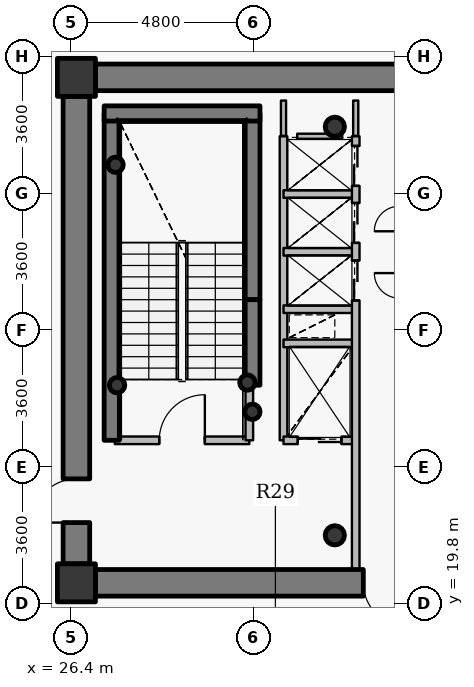
"""IFC4 building model, lengths in metres.
Left out: names, types, materials, properties, quantities, classifications, styles, units other than length and angle.
Written with IfcOpenShell. Run it as: python <this file> out.ifc"""

import sys

from ifc_helpers import new_model, si_unit, direction, frame, frame_2d, origin, origin_2d, place, context, subcontext, project, spatial, rectangle, hollow_circle, extrude, source, transform, mapped, element, fill, save


model = new_model("IFC4")
c1 = context("Model", 3, precision=1e-05, world=origin(), true_north=direction((0.0, 1.0)))
c2 = subcontext(c1, "Body", "Model", "MODEL_VIEW")
j1 = project(units=[si_unit("LENGTHUNIT", "METRE"), si_unit("PLANEANGLEUNIT", "RADIAN")], contexts=[c1])
p1 = place(None, origin())
s1 = spatial("IfcSite", under=j1, at=p1, CompositionType="ELEMENT")
p2 = place(p1, origin())
s2 = spatial("IfcBuilding", under=s1, at=p2, CompositionType="ELEMENT")
p3 = place(p2, frame((0.0, 0.0, 232.8)))
s3 = spatial("IfcBuildingStorey", under=s2, at=p3, CompositionType="ELEMENT", Elevation=232.8)
for number, where, z_axis, x_axis in (
    (1, (26.55, 20.35, 0.0), (0.0, 0.0, 1.0), (1.0, 0.0, 0.0)),
    (2, (26.55, 33.65, 0.0), (0.0, 0.0, 1.0), (1.0, 0.0, 0.0)),
):
    element("IfcColumn", number, at=place(p3, frame(where, z_axis=z_axis, x_axis=x_axis)), inside=s3, PredefinedType="COLUMN", context=c2, shape_type="SweptSolid", body=[
        extrude(rectangle(XDim=1.0, YDim=1.0, at=origin_2d()), origin(), (0.0, 0.0, 1.0), 3.75),
    ])
for number, where, z_axis, x_axis in (
    (3, (33.35, 21.6, 0.0), (0.0, 0.0, 1.0), (1.0, 0.0, 0.0)),
    (4, (33.35, 32.35, 0.0), (0.0, 0.0, 1.0), (1.0, 0.0, 0.0)),
):
    element("IfcColumn", number, at=place(p3, frame(where, z_axis=z_axis, x_axis=x_axis)), inside=s3, PredefinedType="COLUMN", context=c2, shape_type="SweptSolid", body=[
        extrude(hollow_circle(Radius=0.254, WallThickness=0.02, at=origin_2d()), origin(), (0.0, 0.0, 1.0), 3.75),
    ])
p4 = place(p3, frame((27.48, 24.1, 0.0), z_axis=(0.0, 0.0, 1.0), x_axis=(0.0, 1.0, 0.0)))
e5 = element("IfcWall", 5, at=p4, inside=s3, PredefinedType="SHEAR", context=c2, shape_type="SweptSolid", body=[
    extrude(rectangle(XDim=8.6, YDim=0.4, at=frame_2d((4.3, 0.0))), origin(), (0.0, 0.0, 1.0), 3.75),
])
p5 = place(p3, frame((31.18, 27.8, 0.0), z_axis=(0.0, 0.0, 1.0), x_axis=(0.0, 1.0, 0.0)))
e6 = element("IfcWall", 6, at=p5, inside=s3, PredefinedType="SHEAR", context=c2, shape_type="SweptSolid", body=[
    extrude(rectangle(XDim=4.9, YDim=0.4, at=frame_2d((2.45, 0.0))), origin(), (0.0, 0.0, 1.0), 3.75),
])
p6 = place(p3, frame((27.28, 32.7, 0.0), z_axis=(0.0, 0.0, 1.0), x_axis=(1.0, 0.0, 0.0)))
e7 = element("IfcWall", 7, at=p6, inside=s3, PredefinedType="SHEAR", context=c2, shape_type="SweptSolid", body=[
    extrude(rectangle(XDim=4.1, YDim=0.4, at=frame_2d((2.05, 0.0))), origin(), (0.0, 0.0, 1.0), 3.75),
])
for number, where, z_axis, x_axis in (
    (8, (27.58, 31.35, 0.0), (0.0, 0.0, 1.0), (1.0, 0.0, 0.0)),
    (9, (31.05, 25.62, 0.0), (0.0, 0.0, 1.0), (1.0, 0.0, 0.0)),
    (10, (31.18, 24.85, 0.0), (0.0, 0.0, 1.0), (1.0, 0.0, 0.0)),
    (11, (27.62, 25.55, 0.0), (0.0, 0.0, 1.0), (1.0, 0.0, 0.0)),
):
    element("IfcColumn", number, at=place(p3, frame(where, z_axis=z_axis, x_axis=x_axis)), inside=s3, PredefinedType="COLUMN", context=c2, shape_type="SweptSolid", body=[
        extrude(hollow_circle(Radius=0.203, WallThickness=0.016, at=origin_2d()), origin(), (0.0, 0.0, 1.0), 3.75),
    ])
p7 = place(p3, frame((27.05, 33.65, 0.0), z_axis=(0.0, 0.0, 1.0), x_axis=(1.0, 0.0, 0.0)))
e12 = element("IfcWall", 12, at=p7, inside=s3, PredefinedType="SHEAR", context=c2, shape_type="SweptSolid", body=[
    extrude(rectangle(XDim=17.9, YDim=0.7, at=frame_2d((8.95, 0.0))), origin(), (0.0, 0.0, 1.0), 3.05),
])
p8 = place(p7, frame((13.675, 0.0, 0.0)))
e13 = element("IfcOpeningElement", 13, at=p8, cuts=e12, PredefinedType="OPENING", context=c2, shape_type="SweptSolid", body=[
    extrude(rectangle(XDim=1.15, YDim=2.15, at=origin_2d()), frame((0.575, 0.36, 1.075), z_axis=(0.0, -1.0, 0.0), x_axis=(1.0, 0.0, 0.0)), (0.0, 0.0, 1.0), 0.72),
])
p9 = place(p3, frame((44.95, 20.35, 0.0), z_axis=(0.0, 0.0, 1.0), x_axis=(-1.0, 0.0, 0.0)))
e14 = element("IfcWall", 14, at=p9, inside=s3, PredefinedType="SHEAR", context=c2, shape_type="SweptSolid", body=[
    extrude(rectangle(XDim=17.9, YDim=0.7, at=frame_2d((8.95, 0.0))), origin(), (0.0, 0.0, 1.0), 3.05),
])
p10 = place(p9, frame((9.7, 0.0, 0.0)))
e15 = element("IfcOpeningElement", 15, at=p10, cuts=e14, PredefinedType="OPENING", context=c2, shape_type="SweptSolid", body=[
    extrude(rectangle(XDim=1.15, YDim=2.15, at=origin_2d()), frame((0.575, 0.36, 1.075), z_axis=(0.0, -1.0, 0.0), x_axis=(1.0, 0.0, 0.0)), (0.0, 0.0, 1.0), 0.72),
])
p11 = place(p3, frame((26.55, 20.85, 0.0), z_axis=(0.0, 0.0, 1.0), x_axis=(0.0, 1.0, 0.0)))
e16 = element("IfcWall", 16, at=p11, inside=s3, PredefinedType="SHEAR", context=c2, shape_type="SweptSolid", body=[
    extrude(rectangle(XDim=12.3, YDim=0.7, at=frame_2d((6.15, 0.0))), origin(), (0.0, 0.0, 1.0), 3.05),
])
p12 = place(p11, frame((1.085, 0.0, 0.0)))
e17 = element("IfcOpeningElement", 17, at=p12, cuts=e16, PredefinedType="OPENING", context=c2, shape_type="SweptSolid", body=[
    extrude(rectangle(XDim=1.15, YDim=2.15, at=origin_2d()), frame((0.575, 0.36, 1.075), z_axis=(0.0, -1.0, 0.0), x_axis=(1.0, 0.0, 0.0)), (0.0, 0.0, 1.0), 0.72),
])
p13 = place(p3, frame((31.18, 25.55, 0.0), z_axis=(0.0, 0.0, 1.0), x_axis=(0.0, 1.0, 0.0)))
e18 = element("IfcWall", 18, at=p13, inside=s3, PredefinedType="SHEAR", context=c2, shape_type="SweptSolid", body=[
    extrude(rectangle(XDim=2.25, YDim=0.4, at=frame_2d((1.125, 0.0))), origin(), (0.0, 0.0, 1.0), 3.1),
])
p14 = place(p3, frame((27.56, 24.1, 0.0), z_axis=(0.0, 0.0, 1.0), x_axis=(1.0, 0.0, 0.0)))
e19 = element("IfcWall", 19, at=p14, inside=s3, PredefinedType="PARTITIONING", context=c2, shape_type="SweptSolid", body=[
    extrude(rectangle(XDim=3.54, YDim=0.2, at=frame_2d((1.77, 0.0))), origin(), (0.0, 0.0, 1.0), 3.5),
])
p15 = place(p14, frame((1.17, 0.0, 0.0)))
e20 = element("IfcOpeningElement", 20, at=p15, cuts=e19, PredefinedType="OPENING", context=c2, shape_type="SweptSolid", body=[
    extrude(rectangle(XDim=1.2, YDim=2.15, at=origin_2d()), frame((0.6, 0.11, 1.075), z_axis=(0.0, -1.0, 0.0), x_axis=(1.0, 0.0, 0.0)), (0.0, 0.0, 1.0), 0.22),
])
p16 = place(p3, frame((31.1, 24.1, 0.0), z_axis=(0.0, 0.0, 1.0), x_axis=(0.0, 1.0, 0.0)))
e21 = element("IfcWall", 21, at=p16, inside=s3, PredefinedType="PARTITIONING", context=c2, shape_type="SweptSolid", body=[
    extrude(rectangle(XDim=1.44, YDim=0.2, at=frame_2d((0.72, 0.0))), origin(), (0.0, 0.0, 1.0), 3.5),
])
p17 = place(p3, frame((32.0, 24.1, 0.0), z_axis=(0.0, 0.0, 1.0), x_axis=(0.0, 1.0, 0.0)))
e22 = element("IfcWall", 22, at=p17, inside=s3, PredefinedType="PARTITIONING", context=c2, shape_type="SweptSolid", body=[
    extrude(rectangle(XDim=8.0, YDim=0.2, at=frame_2d((4.0, 0.0))), origin(), (0.0, 0.0, 1.0), 3.5),
])
p18 = place(p3, frame((32.0, 24.1, 0.0), z_axis=(0.0, 0.0, 1.0), x_axis=(1.0, 0.0, 0.0)))
e23 = element("IfcWall", 23, at=p18, inside=s3, PredefinedType="PARTITIONING", context=c2, shape_type="SweptSolid", body=[
    extrude(rectangle(XDim=1.9, YDim=0.2, at=frame_2d((0.95, 0.0))), origin(), (0.0, 0.0, 1.0), 3.085),
])
p19 = place(p18, frame((0.375, 0.0, 0.0)))
e24 = element("IfcOpeningElement", 24, at=p19, cuts=e23, PredefinedType="OPENING", context=c2, shape_type="SweptSolid", body=[
    extrude(rectangle(XDim=1.15, YDim=2.15, at=origin_2d()), frame((0.575, 0.11, 1.075), z_axis=(0.0, -1.0, 0.0), x_axis=(1.0, 0.0, 0.0)), (0.0, 0.0, 1.0), 0.22),
])
for number, where, z_axis, x_axis in (
    (25, (32.0, 26.65, 0.0), (0.0, 0.0, 1.0), (1.0, 0.0, 0.0)),
    (26, (32.0, 27.55, 0.0), (0.0, 0.0, 1.0), (1.0, 0.0, 0.0)),
    (27, (32.0, 29.06, 0.0), (0.0, 0.0, 1.0), (1.0, 0.0, 0.0)),
    (28, (32.0, 30.58, 0.0), (0.0, 0.0, 1.0), (1.0, 0.0, 0.0)),
):
    element("IfcWall", number, at=place(p3, frame(where, z_axis=z_axis, x_axis=x_axis)), inside=s3, PredefinedType="PARTITIONING", context=c2, shape_type="SweptSolid", body=[
        extrude(rectangle(XDim=1.9, YDim=0.2, at=frame_2d((0.95, 0.0))), origin(), (0.0, 0.0, 1.0), 3.085),
    ])
p20 = place(p3, frame((33.9, 20.7, 0.0), z_axis=(0.0, 0.0, 1.0), x_axis=(0.0, 1.0, 0.0)))
e29 = element("IfcWall", 29, at=p20, inside=s3, PredefinedType="PARTITIONING", context=c2, shape_type="SweptSolid", body=[
    extrude(rectangle(XDim=11.4, YDim=0.2, at=frame_2d((5.7, 0.0))), origin(), (0.0, 0.0, 1.0), 3.085),
])
p21 = place(p20, frame((7.08, 0.0, 0.0)))
e30 = element("IfcOpeningElement", 30, at=p21, cuts=e29, PredefinedType="OPENING", context=c2, shape_type="SweptSolid", body=[
    extrude(rectangle(XDim=1.05, YDim=2.15, at=origin_2d()), frame((0.525, 0.11, 1.075), z_axis=(0.0, -1.0, 0.0), x_axis=(1.0, 0.0, 0.0)), (0.0, 0.0, 1.0), 0.22),
])
p22 = place(p20, frame((8.595, 0.0, 0.0)))
e31 = element("IfcOpeningElement", 31, at=p22, cuts=e29, PredefinedType="OPENING", context=c2, shape_type="SweptSolid", body=[
    extrude(rectangle(XDim=1.05, YDim=2.15, at=origin_2d()), frame((0.525, 0.11, 1.075), z_axis=(0.0, -1.0, 0.0), x_axis=(1.0, 0.0, 0.0)), (0.0, 0.0, 1.0), 0.22),
])
p23 = place(p20, frame((10.095, 0.0, 0.0)))
e32 = element("IfcOpeningElement", 32, at=p23, cuts=e29, PredefinedType="OPENING", context=c2, shape_type="SweptSolid", body=[
    extrude(rectangle(XDim=1.05, YDim=2.15, at=origin_2d()), frame((0.525, 0.11, 1.075), z_axis=(0.0, -1.0, 0.0), x_axis=(1.0, 0.0, 0.0)), (0.0, 0.0, 1.0), 0.22),
])
p24 = place(p3, frame((32.36, 32.1, 0.0), z_axis=(0.0, 0.0, 1.0), x_axis=(1.0, 0.0, 0.0)))
e33 = element("IfcWall", 33, at=p24, inside=s3, PredefinedType="PARTITIONING", context=c2, shape_type="SweptSolid", body=[
    extrude(rectangle(XDim=1.18, YDim=0.135, at=frame_2d((0.59, 0.0))), origin(), (0.0, 0.0, 1.0), 3.085),
])
p25 = place(p3, frame((32.0, 33.04, 0.0), z_axis=(0.0, 0.0, 1.0), x_axis=(0.0, -1.0, 0.0)))
e34 = element("IfcWall", 34, at=p25, inside=s3, PredefinedType="PARTITIONING", context=c2, shape_type="SweptSolid", body=[
    extrude(rectangle(XDim=0.93, YDim=0.135, at=frame_2d((0.465, 0.0))), origin(), (0.0, 0.0, 1.0), 3.035),
])
p26 = place(p3, frame((33.9, 32.11, 0.0), z_axis=(0.0, 0.0, 1.0), x_axis=(0.0, 1.0, 0.0)))
e35 = element("IfcWall", 35, at=p26, inside=s3, PredefinedType="PARTITIONING", context=c2, shape_type="SweptSolid", body=[
    extrude(rectangle(XDim=0.93, YDim=0.135, at=frame_2d((0.465, 0.0))), origin(), (0.0, 0.0, 1.0), 3.085),
])
p27 = place(p3, frame((27.04, 34.0, 0.0), z_axis=(0.0, 0.0, 1.0), x_axis=(-1.0, 0.0, 0.0)))
e36 = element("IfcWall", 36, at=p27, inside=s3, PredefinedType="PARTITIONING", context=c2, shape_type="SweptSolid", body=[
    extrude(rectangle(XDim=0.84, YDim=0.135, at=frame_2d((0.42, 0.0))), origin(), (0.0, 0.0, 1.0), 2.935),
])
p28 = place(p3, frame((26.2, 33.692, 0.0), z_axis=(0.0, 0.0, 1.0), x_axis=(0.0, -1.0, 0.0)))
e37 = element("IfcWall", 37, at=p28, inside=s3, PredefinedType="PARTITIONING", context=c2, shape_type="SweptSolid", body=[
    extrude(rectangle(XDim=0.532, YDim=0.135, at=frame_2d((0.266, 0.0))), origin(), (0.0, 0.0, 1.0), 3.5),
])
p29 = place(p3, frame((26.2, 20.84, 0.0), z_axis=(0.0, 0.0, 1.0), x_axis=(0.0, -1.0, 0.0)))
e38 = element("IfcWall", 38, at=p29, inside=s3, PredefinedType="PARTITIONING", context=c2, shape_type="SweptSolid", body=[
    extrude(rectangle(XDim=0.84, YDim=0.135, at=frame_2d((0.42, 0.0))), origin(), (0.0, 0.0, 1.0), 3.5),
])
p30 = place(p3, frame((26.508, 20.0, 0.0), z_axis=(0.0, 0.0, 1.0), x_axis=(1.0, 0.0, 0.0)))
e39 = element("IfcWall", 39, at=p30, inside=s3, PredefinedType="PARTITIONING", context=c2, shape_type="SweptSolid", body=[
    extrude(rectangle(XDim=0.532, YDim=0.135, at=frame_2d((0.266, 0.0))), origin(), (0.0, 0.0, 1.0), 2.935),
])
m1 = source(origin(), c2, "Body", "SweptSolid", [
    extrude(rectangle(XDim=1.15, YDim=2.15, at=origin_2d()), frame((0.575, 0.025, 1.075), z_axis=(0.0, -1.0, 0.0), x_axis=(1.0, 0.0, 0.0)), (0.0, 0.0, 1.0), 0.05),
])
p31 = place(p12, origin())
e40 = element("IfcDoor", 40, at=p31, inside=s3, OperationType="SINGLE_SWING_LEFT", PredefinedType="DOOR", context=c2, shape_type="MappedRepresentation", body=[
    mapped(m1, transform((0.0, 0.0, 0.0), x_axis=(1.0, 0.0, 0.0), y_axis=(0.0, 1.0, 0.0), z_axis=(0.0, 0.0, 1.0), scale=1.0)),
])
fill(e17, e40)
p32 = place(p10, origin())
e41 = element("IfcDoor", 41, at=p32, inside=s3, OperationType="SINGLE_SWING_LEFT", PredefinedType="DOOR", context=c2, shape_type="MappedRepresentation", body=[
    mapped(m1, transform((0.0, 0.0, 0.0), x_axis=(1.0, 0.0, 0.0), y_axis=(0.0, 1.0, 0.0), z_axis=(0.0, 0.0, 1.0), scale=1.0)),
])
fill(e15, e41)
m2 = source(origin(), c2, "Body", "SweptSolid", [
    extrude(rectangle(XDim=1.2, YDim=2.15, at=origin_2d()), frame((0.6, 0.025, 1.075), z_axis=(0.0, -1.0, 0.0), x_axis=(1.0, 0.0, 0.0)), (0.0, 0.0, 1.0), 0.05),
])
p33 = place(p15, origin())
e42 = element("IfcDoor", 42, at=p33, inside=s3, OperationType="SINGLE_SWING_RIGHT", PredefinedType="DOOR", context=c2, shape_type="MappedRepresentation", body=[
    mapped(m2, transform((0.0, 0.0, 0.0), x_axis=(1.0, 0.0, 0.0), y_axis=(0.0, 1.0, 0.0), z_axis=(0.0, 0.0, 1.0), scale=1.0)),
])
fill(e20, e42)
m3 = source(origin(), c2, "Body", "SweptSolid", [
    extrude(rectangle(XDim=1.15, YDim=2.15, at=origin_2d()), frame((0.575, 0.025, 1.075), z_axis=(0.0, -1.0, 0.0), x_axis=(1.0, 0.0, 0.0)), (0.0, 0.0, 1.0), 0.05),
])
p34 = place(p19, origin())
e43 = element("IfcDoor", 43, at=p34, inside=s3, OperationType="DOUBLE_DOOR_SLIDING", PredefinedType="USERDEFINED", context=c2, shape_type="MappedRepresentation", body=[
    mapped(m3, transform((0.0, 0.0, 0.0), x_axis=(1.0, 0.0, 0.0), y_axis=(0.0, 1.0, 0.0), z_axis=(0.0, 0.0, 1.0), scale=1.0)),
])
fill(e24, e43)
m4 = source(origin(), c2, "Body", "SweptSolid", [
    extrude(rectangle(XDim=1.05, YDim=2.15, at=origin_2d()), frame((0.525, 0.025, 1.075), z_axis=(0.0, -1.0, 0.0), x_axis=(1.0, 0.0, 0.0)), (0.0, 0.0, 1.0), 0.05),
])
p35 = place(p21, origin())
e44 = element("IfcDoor", 44, at=p35, inside=s3, OperationType="DOUBLE_DOOR_SLIDING", PredefinedType="USERDEFINED", context=c2, shape_type="MappedRepresentation", body=[
    mapped(m4, transform((0.0, 0.0, 0.0), x_axis=(1.0, 0.0, 0.0), y_axis=(0.0, 1.0, 0.0), z_axis=(0.0, 0.0, 1.0), scale=1.0)),
])
fill(e30, e44)
p36 = place(p22, origin())
e45 = element("IfcDoor", 45, at=p36, inside=s3, OperationType="DOUBLE_DOOR_SLIDING", PredefinedType="USERDEFINED", context=c2, shape_type="MappedRepresentation", body=[
    mapped(m4, transform((0.0, 0.0, 0.0), x_axis=(1.0, 0.0, 0.0), y_axis=(0.0, 1.0, 0.0), z_axis=(0.0, 0.0, 1.0), scale=1.0)),
])
fill(e31, e45)
p37 = place(p23, origin())
e46 = element("IfcDoor", 46, at=p37, inside=s3, OperationType="DOUBLE_DOOR_SLIDING", PredefinedType="USERDEFINED", context=c2, shape_type="MappedRepresentation", body=[
    mapped(m4, transform((0.0, 0.0, 0.0), x_axis=(1.0, 0.0, 0.0), y_axis=(0.0, 1.0, 0.0), z_axis=(0.0, 0.0, 1.0), scale=1.0)),
])
fill(e32, e46)
save(model, sys.argv[1])
